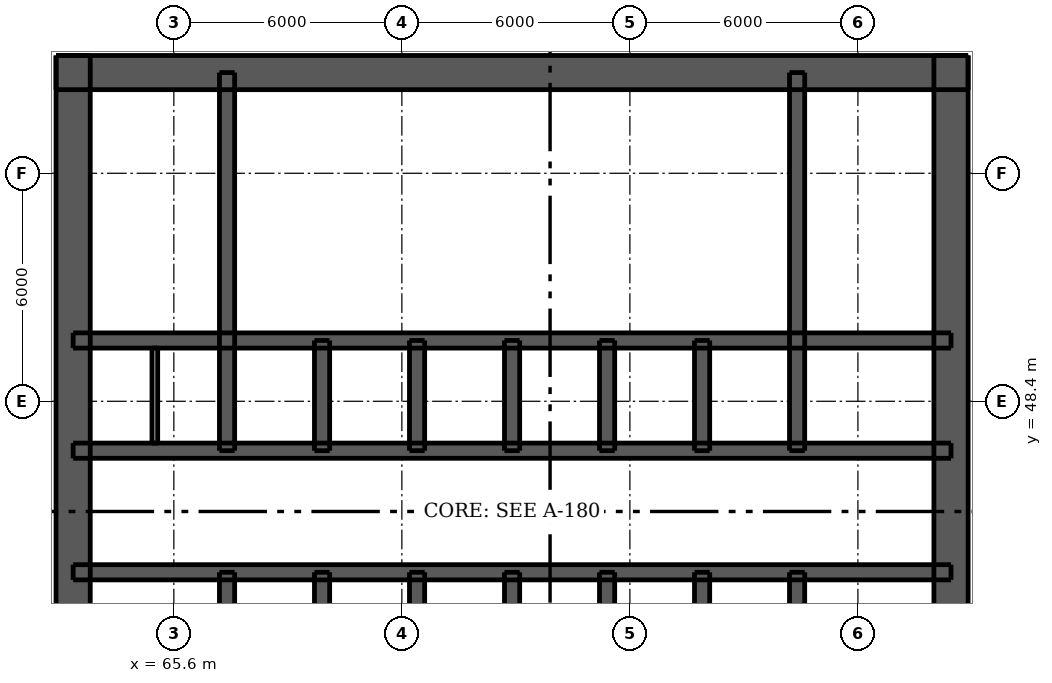
"""IFC4 building model, lengths in metres.
Left out: names, types, materials, properties, quantities, classifications, styles, units other than length and angle.
Written with IfcOpenShell. Run it as: python <this file> out.ifc"""

import sys

from ifc_helpers import new_model, si_unit, direction, frame, frame_2d, origin, place, context, subcontext, project, spatial, rectangle, extrude, element, fill, save


model = new_model("IFC4")
c1 = context("Model", 3, precision=1e-05, world=origin(), true_north=direction((0.0, 1.0)))
c2 = subcontext(c1, "Body", "Model", "MODEL_VIEW")
j1 = project(units=[si_unit("LENGTHUNIT", "METRE"), si_unit("PLANEANGLEUNIT", "RADIAN")], contexts=[c1])
p1 = place(None, origin())
s1 = spatial("IfcSite", under=j1, at=p1, CompositionType="ELEMENT")
p2 = place(p1, origin())
s2 = spatial("IfcBuilding", under=s1, at=p2, CompositionType="ELEMENT")
p3 = place(p2, origin())
s3 = spatial("IfcBuildingStorey", under=s2, at=p3, CompositionType="ELEMENT", Elevation=0.0)
p4 = place(p3, frame((62.5, 57.05, -2.5), z_axis=(0.0, 0.0, 1.0), x_axis=(1.0, 0.0, 0.0)))
e1 = element("IfcWall", 1, at=p4, inside=s3, PredefinedType="SHEAR", context=c2, shape_type="SweptSolid", body=[
    extrude(rectangle(XDim=24.0, YDim=0.9, at=frame_2d((12.0, 0.0))), origin(), (0.0, 0.0, 1.0), 7.7),
])
p5 = place(p4, frame((20.85, 0.0, 2.5)))
e2 = element("IfcOpeningElement", 2, at=p5, cuts=e1, PredefinedType="OPENING", context=c2, shape_type="SweptSolid", body=[
    extrude(rectangle(XDim=1.1, YDim=2.1, at=frame_2d((0.55, 1.05))), frame((0.0, 0.46, 0.0), z_axis=(0.0, -1.0, 0.0), x_axis=(1.0, 0.0, 0.0)), (0.0, 0.0, 1.0), 0.92),
])
p6 = place(p4, frame((2.05, 0.0, 2.5)))
e3 = element("IfcOpeningElement", 3, at=p6, cuts=e1, PredefinedType="OPENING", context=c2, shape_type="SweptSolid", body=[
    extrude(rectangle(XDim=1.1, YDim=2.1, at=frame_2d((0.55, 1.05))), frame((0.0, 0.46, 0.0), z_axis=(0.0, -1.0, 0.0), x_axis=(1.0, 0.0, 0.0)), (0.0, 0.0, 1.0), 0.92),
])
p7 = place(p4, frame((11.55, 0.0, 2.5)))
e4 = element("IfcOpeningElement", 4, at=p7, cuts=e1, PredefinedType="OPENING", context=c2, shape_type="SweptSolid", body=[
    extrude(rectangle(XDim=0.9, YDim=2.1, at=frame_2d((0.45, 1.05))), frame((0.0, 0.46, 0.0), z_axis=(0.0, -1.0, 0.0), x_axis=(1.0, 0.0, 0.0)), (0.0, 0.0, 1.0), 0.92),
])
p8 = place(p3, frame((62.95, 33.5, -2.5), z_axis=(0.0, 0.0, 1.0), x_axis=(0.0, 1.0, 0.0)))
e5 = element("IfcWall", 5, at=p8, inside=s3, PredefinedType="SHEAR", context=c2, shape_type="SweptSolid", body=[
    extrude(rectangle(XDim=24.0, YDim=0.9, at=frame_2d((12.0, 0.0))), origin(), (0.0, 0.0, 1.0), 7.7),
])
p9 = place(p8, frame((11.2, 0.0, 2.5)))
e6 = element("IfcOpeningElement", 6, at=p9, cuts=e5, PredefinedType="OPENING", context=c2, shape_type="SweptSolid", body=[
    extrude(rectangle(XDim=1.6, YDim=2.1, at=frame_2d((0.8, 1.05))), frame((0.0, 0.46, 0.0), z_axis=(0.0, -1.0, 0.0), x_axis=(1.0, 0.0, 0.0)), (0.0, 0.0, 1.0), 0.92),
])
p10 = place(p3, frame((86.05, 33.5, -2.5), z_axis=(0.0, 0.0, 1.0), x_axis=(0.0, 1.0, 0.0)))
e7 = element("IfcWall", 7, at=p10, inside=s3, PredefinedType="SHEAR", context=c2, shape_type="SweptSolid", body=[
    extrude(rectangle(XDim=24.0, YDim=0.9, at=frame_2d((12.0, 0.0))), origin(), (0.0, 0.0, 1.0), 7.7),
])
p11 = place(p10, frame((11.2, 0.0, 2.5)))
e8 = element("IfcOpeningElement", 8, at=p11, cuts=e7, PredefinedType="OPENING", context=c2, shape_type="SweptSolid", body=[
    extrude(rectangle(XDim=1.6, YDim=2.1, at=frame_2d((0.8, 1.05))), frame((0.0, 0.46, 0.0), z_axis=(0.0, -1.0, 0.0), x_axis=(1.0, 0.0, 0.0)), (0.0, 0.0, 1.0), 0.92),
])
p12 = place(p3, frame((62.95, 43.9, -2.5), z_axis=(0.0, 0.0, 1.0), x_axis=(1.0, 0.0, 0.0)))
e9 = element("IfcWall", 9, at=p12, inside=s3, PredefinedType="SHEAR", context=c2, shape_type="SweptSolid", body=[
    extrude(rectangle(XDim=23.1, YDim=0.4, at=frame_2d((11.55, 0.0))), origin(), (0.0, 0.0, 1.0), 7.7),
])
p13 = place(p12, frame((1.7, 0.0, 2.5)))
e10 = element("IfcOpeningElement", 10, at=p13, cuts=e9, PredefinedType="OPENING", context=c2, shape_type="SweptSolid", body=[
    extrude(rectangle(XDim=0.9, YDim=2.1, at=frame_2d((0.45, 1.05))), frame((0.0, 0.21, 0.0), z_axis=(0.0, -1.0, 0.0), x_axis=(1.0, 0.0, 0.0)), (0.0, 0.0, 1.0), 0.42),
])
p14 = place(p12, frame((20.5, 0.0, 2.5)))
e11 = element("IfcOpeningElement", 11, at=p14, cuts=e9, PredefinedType="OPENING", context=c2, shape_type="SweptSolid", body=[
    extrude(rectangle(XDim=0.9, YDim=2.1, at=frame_2d((0.45, 1.05))), frame((0.0, 0.21, 0.0), z_axis=(0.0, -1.0, 0.0), x_axis=(1.0, 0.0, 0.0)), (0.0, 0.0, 1.0), 0.42),
])
p15 = place(p12, frame((4.75, 0.0, 2.5)))
e12 = element("IfcOpeningElement", 12, at=p15, cuts=e9, PredefinedType="OPENING", context=c2, shape_type="SweptSolid", body=[
    extrude(rectangle(XDim=1.1, YDim=2.1, at=frame_2d((0.55, 1.05))), frame((0.0, 0.21, 0.0), z_axis=(0.0, -1.0, 0.0), x_axis=(1.0, 0.0, 0.0)), (0.0, 0.0, 1.0), 0.42),
])
p16 = place(p12, frame((7.25, 0.0, 2.5)))
e13 = element("IfcOpeningElement", 13, at=p16, cuts=e9, PredefinedType="OPENING", context=c2, shape_type="SweptSolid", body=[
    extrude(rectangle(XDim=1.1, YDim=2.1, at=frame_2d((0.55, 1.05))), frame((0.0, 0.21, 0.0), z_axis=(0.0, -1.0, 0.0), x_axis=(1.0, 0.0, 0.0)), (0.0, 0.0, 1.0), 0.42),
])
p17 = place(p12, frame((9.75, 0.0, 2.5)))
e14 = element("IfcOpeningElement", 14, at=p17, cuts=e9, PredefinedType="OPENING", context=c2, shape_type="SweptSolid", body=[
    extrude(rectangle(XDim=1.1, YDim=2.1, at=frame_2d((0.55, 1.05))), frame((0.0, 0.21, 0.0), z_axis=(0.0, -1.0, 0.0), x_axis=(1.0, 0.0, 0.0)), (0.0, 0.0, 1.0), 0.42),
])
p18 = place(p12, frame((12.25, 0.0, 2.5)))
e15 = element("IfcOpeningElement", 15, at=p18, cuts=e9, PredefinedType="OPENING", context=c2, shape_type="SweptSolid", body=[
    extrude(rectangle(XDim=1.1, YDim=2.1, at=frame_2d((0.55, 1.05))), frame((0.0, 0.21, 0.0), z_axis=(0.0, -1.0, 0.0), x_axis=(1.0, 0.0, 0.0)), (0.0, 0.0, 1.0), 0.42),
])
p19 = place(p12, frame((14.75, 0.0, 2.5)))
e16 = element("IfcOpeningElement", 16, at=p19, cuts=e9, PredefinedType="OPENING", context=c2, shape_type="SweptSolid", body=[
    extrude(rectangle(XDim=1.1, YDim=2.1, at=frame_2d((0.55, 1.05))), frame((0.0, 0.21, 0.0), z_axis=(0.0, -1.0, 0.0), x_axis=(1.0, 0.0, 0.0)), (0.0, 0.0, 1.0), 0.42),
])
p20 = place(p12, frame((17.25, 0.0, 2.5)))
e17 = element("IfcOpeningElement", 17, at=p20, cuts=e9, PredefinedType="OPENING", context=c2, shape_type="SweptSolid", body=[
    extrude(rectangle(XDim=1.1, YDim=2.1, at=frame_2d((0.55, 1.05))), frame((0.0, 0.21, 0.0), z_axis=(0.0, -1.0, 0.0), x_axis=(1.0, 0.0, 0.0)), (0.0, 0.0, 1.0), 0.42),
])
p21 = place(p3, frame((62.95, 47.1, -2.5), z_axis=(0.0, 0.0, 1.0), x_axis=(1.0, 0.0, 0.0)))
e18 = element("IfcWall", 18, at=p21, inside=s3, PredefinedType="SHEAR", context=c2, shape_type="SweptSolid", body=[
    extrude(rectangle(XDim=23.1, YDim=0.4, at=frame_2d((11.55, 0.0))), origin(), (0.0, 0.0, 1.0), 7.7),
])
p22 = place(p21, frame((0.85, 0.0, 2.5)))
e19 = element("IfcOpeningElement", 19, at=p22, cuts=e18, PredefinedType="OPENING", context=c2, shape_type="SweptSolid", body=[
    extrude(rectangle(XDim=0.9, YDim=2.1, at=frame_2d((0.45, 1.05))), frame((0.0, 0.21, 0.0), z_axis=(0.0, -1.0, 0.0), x_axis=(1.0, 0.0, 0.0)), (0.0, 0.0, 1.0), 0.42),
])
p23 = place(p21, frame((2.55, 0.0, 2.5)))
e20 = element("IfcOpeningElement", 20, at=p23, cuts=e18, PredefinedType="OPENING", context=c2, shape_type="SweptSolid", body=[
    extrude(rectangle(XDim=0.9, YDim=2.1, at=frame_2d((0.45, 1.05))), frame((0.0, 0.21, 0.0), z_axis=(0.0, -1.0, 0.0), x_axis=(1.0, 0.0, 0.0)), (0.0, 0.0, 1.0), 0.42),
])
p24 = place(p21, frame((20.5, 0.0, 2.5)))
e21 = element("IfcOpeningElement", 21, at=p24, cuts=e18, PredefinedType="OPENING", context=c2, shape_type="SweptSolid", body=[
    extrude(rectangle(XDim=0.9, YDim=2.1, at=frame_2d((0.45, 1.05))), frame((0.0, 0.21, 0.0), z_axis=(0.0, -1.0, 0.0), x_axis=(1.0, 0.0, 0.0)), (0.0, 0.0, 1.0), 0.42),
])
p25 = place(p21, frame((4.75, 0.0, 2.5)))
e22 = element("IfcOpeningElement", 22, at=p25, cuts=e18, PredefinedType="OPENING", context=c2, shape_type="SweptSolid", body=[
    extrude(rectangle(XDim=1.1, YDim=2.1, at=frame_2d((0.55, 1.05))), frame((0.0, 0.21, 0.0), z_axis=(0.0, -1.0, 0.0), x_axis=(1.0, 0.0, 0.0)), (0.0, 0.0, 1.0), 0.42),
])
p26 = place(p21, frame((7.25, 0.0, 2.5)))
e23 = element("IfcOpeningElement", 23, at=p26, cuts=e18, PredefinedType="OPENING", context=c2, shape_type="SweptSolid", body=[
    extrude(rectangle(XDim=1.1, YDim=2.1, at=frame_2d((0.55, 1.05))), frame((0.0, 0.21, 0.0), z_axis=(0.0, -1.0, 0.0), x_axis=(1.0, 0.0, 0.0)), (0.0, 0.0, 1.0), 0.42),
])
p27 = place(p21, frame((9.75, 0.0, 2.5)))
e24 = element("IfcOpeningElement", 24, at=p27, cuts=e18, PredefinedType="OPENING", context=c2, shape_type="SweptSolid", body=[
    extrude(rectangle(XDim=1.1, YDim=2.1, at=frame_2d((0.55, 1.05))), frame((0.0, 0.21, 0.0), z_axis=(0.0, -1.0, 0.0), x_axis=(1.0, 0.0, 0.0)), (0.0, 0.0, 1.0), 0.42),
])
p28 = place(p21, frame((12.25, 0.0, 2.5)))
e25 = element("IfcOpeningElement", 25, at=p28, cuts=e18, PredefinedType="OPENING", context=c2, shape_type="SweptSolid", body=[
    extrude(rectangle(XDim=1.1, YDim=2.1, at=frame_2d((0.55, 1.05))), frame((0.0, 0.21, 0.0), z_axis=(0.0, -1.0, 0.0), x_axis=(1.0, 0.0, 0.0)), (0.0, 0.0, 1.0), 0.42),
])
p29 = place(p21, frame((14.75, 0.0, 2.5)))
e26 = element("IfcOpeningElement", 26, at=p29, cuts=e18, PredefinedType="OPENING", context=c2, shape_type="SweptSolid", body=[
    extrude(rectangle(XDim=1.1, YDim=2.1, at=frame_2d((0.55, 1.05))), frame((0.0, 0.21, 0.0), z_axis=(0.0, -1.0, 0.0), x_axis=(1.0, 0.0, 0.0)), (0.0, 0.0, 1.0), 0.42),
])
p30 = place(p21, frame((17.25, 0.0, 2.5)))
e27 = element("IfcOpeningElement", 27, at=p30, cuts=e18, PredefinedType="OPENING", context=c2, shape_type="SweptSolid", body=[
    extrude(rectangle(XDim=1.1, YDim=2.1, at=frame_2d((0.55, 1.05))), frame((0.0, 0.21, 0.0), z_axis=(0.0, -1.0, 0.0), x_axis=(1.0, 0.0, 0.0)), (0.0, 0.0, 1.0), 0.42),
])
p31 = place(p3, frame((62.95, 50.0, -2.5), z_axis=(0.0, 0.0, 1.0), x_axis=(1.0, 0.0, 0.0)))
e28 = element("IfcWall", 28, at=p31, inside=s3, PredefinedType="SHEAR", context=c2, shape_type="SweptSolid", body=[
    extrude(rectangle(XDim=23.1, YDim=0.4, at=frame_2d((11.55, 0.0))), origin(), (0.0, 0.0, 1.0), 7.7),
])
p32 = place(p3, frame((67.0, 33.95, -2.5), z_axis=(0.0, 0.0, 1.0), x_axis=(0.0, 1.0, 0.0)))
e29 = element("IfcWall", 29, at=p32, inside=s3, PredefinedType="SHEAR", context=c2, shape_type="SweptSolid", body=[
    extrude(rectangle(XDim=9.95, YDim=0.4, at=frame_2d((4.975, 0.0))), origin(), (0.0, 0.0, 1.0), 7.7),
])
p33 = place(p32, frame((0.65, 0.0, 2.5)))
e30 = element("IfcOpeningElement", 30, at=p33, cuts=e29, PredefinedType="OPENING", context=c2, shape_type="SweptSolid", body=[
    extrude(rectangle(XDim=1.1, YDim=2.1, at=frame_2d((0.55, 1.05))), frame((0.0, 0.21, 0.0), z_axis=(0.0, -1.0, 0.0), x_axis=(1.0, 0.0, 0.0)), (0.0, 0.0, 1.0), 0.42),
])
for number, where, z_axis, x_axis in (
    (31, (67.0, 47.1, -2.5), (0.0, 0.0, 1.0), (0.0, 1.0, 0.0)),
    (32, (82.0, 33.95, -2.5), (0.0, 0.0, 1.0), (0.0, 1.0, 0.0)),
    (33, (82.0, 47.1, -2.5), (0.0, 0.0, 1.0), (0.0, 1.0, 0.0)),
):
    element("IfcWall", number, at=place(p3, frame(where, z_axis=z_axis, x_axis=x_axis)), inside=s3, PredefinedType="SHEAR", context=c2, shape_type="SweptSolid", body=[
        extrude(rectangle(XDim=9.95, YDim=0.4, at=frame_2d((4.975, 0.0))), origin(), (0.0, 0.0, 1.0), 7.7),
    ])
for number, where, z_axis, x_axis in (
    (34, (69.5, 41.0, -2.5), (0.0, 0.0, 1.0), (0.0, 1.0, 0.0)),
    (35, (69.5, 47.1, -2.5), (0.0, 0.0, 1.0), (0.0, 1.0, 0.0)),
    (36, (72.0, 41.0, -2.5), (0.0, 0.0, 1.0), (0.0, 1.0, 0.0)),
    (37, (72.0, 47.1, -2.5), (0.0, 0.0, 1.0), (0.0, 1.0, 0.0)),
    (38, (74.5, 41.0, -2.5), (0.0, 0.0, 1.0), (0.0, 1.0, 0.0)),
    (39, (74.5, 47.1, -2.5), (0.0, 0.0, 1.0), (0.0, 1.0, 0.0)),
    (40, (77.0, 41.0, -2.5), (0.0, 0.0, 1.0), (0.0, 1.0, 0.0)),
    (41, (77.0, 47.1, -2.5), (0.0, 0.0, 1.0), (0.0, 1.0, 0.0)),
    (42, (79.5, 41.0, -2.5), (0.0, 0.0, 1.0), (0.0, 1.0, 0.0)),
    (43, (79.5, 47.1, -2.5), (0.0, 0.0, 1.0), (0.0, 1.0, 0.0)),
):
    element("IfcWall", number, at=place(p3, frame(where, z_axis=z_axis, x_axis=x_axis)), inside=s3, PredefinedType="SHEAR", context=c2, shape_type="SweptSolid", body=[
        extrude(rectangle(XDim=2.9, YDim=0.4, at=frame_2d((1.45, 0.0))), origin(), (0.0, 0.0, 1.0), 7.7),
    ])
p34 = place(p3, frame((65.1, 47.3, 0.0), z_axis=(0.0, 0.0, 1.0), x_axis=(0.0, 1.0, 0.0)))
e44 = element("IfcWall", 44, at=p34, inside=s3, PredefinedType="PLUMBINGWALL", context=c2, shape_type="SweptSolid", body=[
    extrude(rectangle(XDim=2.5, YDim=0.15, at=frame_2d((1.25, 0.0))), origin(), (0.0, 0.0, 1.0), 5.2),
])
p35 = place(p5, origin())
e45 = element("IfcDoor", 45, at=p35, inside=s3, OperationType="SINGLE_SWING_RIGHT", PredefinedType="DOOR", context=c2, shape_type="SweptSolid", body=[
    extrude(rectangle(XDim=1.1, YDim=2.1, at=frame_2d((0.55, 1.05))), frame((0.0, -0.388, 0.0), z_axis=(0.0, -1.0, 0.0), x_axis=(1.0, 0.0, 0.0)), (0.0, 0.0, 1.0), 0.05),
])
fill(e2, e45)
p36 = place(p6, origin())
e46 = element("IfcDoor", 46, at=p36, inside=s3, OperationType="SINGLE_SWING_LEFT", PredefinedType="DOOR", context=c2, shape_type="SweptSolid", body=[
    extrude(rectangle(XDim=1.1, YDim=2.1, at=frame_2d((0.55, 1.05))), frame((0.0, -0.388, 0.0), z_axis=(0.0, -1.0, 0.0), x_axis=(1.0, 0.0, 0.0)), (0.0, 0.0, 1.0), 0.05),
])
fill(e3, e46)
p37 = place(p9, origin())
e47 = element("IfcDoor", 47, at=p37, inside=s3, OperationType="DOUBLE_DOOR_SINGLE_SWING", PredefinedType="DOOR", context=c2, shape_type="SweptSolid", body=[
    extrude(rectangle(XDim=1.6, YDim=2.1, at=frame_2d((0.8, 1.05))), frame((0.0, -0.388, 0.0), z_axis=(0.0, -1.0, 0.0), x_axis=(1.0, 0.0, 0.0)), (0.0, 0.0, 1.0), 0.05),
])
fill(e6, e47)
p38 = place(p11, origin())
e48 = element("IfcDoor", 48, at=p38, inside=s3, OperationType="DOUBLE_DOOR_SINGLE_SWING", PredefinedType="DOOR", context=c2, shape_type="SweptSolid", body=[
    extrude(rectangle(XDim=1.6, YDim=2.1, at=frame_2d((0.8, 1.05))), frame((0.0, 0.438, 0.0), z_axis=(0.0, -1.0, 0.0), x_axis=(1.0, 0.0, 0.0)), (0.0, 0.0, 1.0), 0.05),
])
fill(e8, e48)
p39 = place(p13, origin())
e49 = element("IfcDoor", 49, at=p39, inside=s3, OperationType="SINGLE_SWING_LEFT", PredefinedType="DOOR", context=c2, shape_type="SweptSolid", body=[
    extrude(rectangle(XDim=0.9, YDim=2.1, at=frame_2d((0.45, 1.05))), frame((0.0, -0.138, 0.0), z_axis=(0.0, -1.0, 0.0), x_axis=(1.0, 0.0, 0.0)), (0.0, 0.0, 1.0), 0.05),
])
fill(e10, e49)
p40 = place(p14, origin())
e50 = element("IfcDoor", 50, at=p40, inside=s3, OperationType="SINGLE_SWING_LEFT", PredefinedType="DOOR", context=c2, shape_type="SweptSolid", body=[
    extrude(rectangle(XDim=0.9, YDim=2.1, at=frame_2d((0.45, 1.05))), frame((0.0, -0.138, 0.0), z_axis=(0.0, -1.0, 0.0), x_axis=(1.0, 0.0, 0.0)), (0.0, 0.0, 1.0), 0.05),
])
fill(e11, e50)
p41 = place(p22, origin())
e51 = element("IfcDoor", 51, at=p41, inside=s3, OperationType="SINGLE_SWING_LEFT", PredefinedType="DOOR", context=c2, shape_type="SweptSolid", body=[
    extrude(rectangle(XDim=0.9, YDim=2.1, at=frame_2d((0.45, 1.05))), frame((0.0, 0.188, 0.0), z_axis=(0.0, -1.0, 0.0), x_axis=(1.0, 0.0, 0.0)), (0.0, 0.0, 1.0), 0.05),
])
fill(e19, e51)
p42 = place(p23, origin())
e52 = element("IfcDoor", 52, at=p42, inside=s3, OperationType="SINGLE_SWING_RIGHT", PredefinedType="DOOR", context=c2, shape_type="SweptSolid", body=[
    extrude(rectangle(XDim=0.9, YDim=2.1, at=frame_2d((0.45, 1.05))), frame((0.0, 0.188, 0.0), z_axis=(0.0, -1.0, 0.0), x_axis=(1.0, 0.0, 0.0)), (0.0, 0.0, 1.0), 0.05),
])
fill(e20, e52)
p43 = place(p24, origin())
e53 = element("IfcDoor", 53, at=p43, inside=s3, OperationType="SINGLE_SWING_LEFT", PredefinedType="DOOR", context=c2, shape_type="SweptSolid", body=[
    extrude(rectangle(XDim=0.9, YDim=2.1, at=frame_2d((0.45, 1.05))), frame((0.0, 0.188, 0.0), z_axis=(0.0, -1.0, 0.0), x_axis=(1.0, 0.0, 0.0)), (0.0, 0.0, 1.0), 0.05),
])
fill(e21, e53)
p44 = place(p7, origin())
e54 = element("IfcDoor", 54, at=p44, inside=s3, OperationType="SINGLE_SWING_RIGHT", PredefinedType="DOOR", context=c2, shape_type="SweptSolid", body=[
    extrude(rectangle(XDim=0.9, YDim=2.1, at=frame_2d((0.45, 1.05))), frame((0.0, -0.388, 0.0), z_axis=(0.0, -1.0, 0.0), x_axis=(1.0, 0.0, 0.0)), (0.0, 0.0, 1.0), 0.05),
])
fill(e4, e54)
p45 = place(p15, origin())
e55 = element("IfcDoor", 55, at=p45, inside=s3, OperationType="DOUBLE_DOOR_SLIDING", PredefinedType="DOOR", context=c2, shape_type="SweptSolid", body=[
    extrude(rectangle(XDim=1.1, YDim=2.1, at=frame_2d((0.55, 1.05))), frame((0.0, 0.025, 0.0), z_axis=(0.0, -1.0, 0.0), x_axis=(1.0, 0.0, 0.0)), (0.0, 0.0, 1.0), 0.05),
])
fill(e12, e55)
p46 = place(p25, origin())
e56 = element("IfcDoor", 56, at=p46, inside=s3, OperationType="DOUBLE_DOOR_SLIDING", PredefinedType="DOOR", context=c2, shape_type="SweptSolid", body=[
    extrude(rectangle(XDim=1.1, YDim=2.1, at=frame_2d((0.55, 1.05))), frame((0.0, 0.025, 0.0), z_axis=(0.0, -1.0, 0.0), x_axis=(1.0, 0.0, 0.0)), (0.0, 0.0, 1.0), 0.05),
])
fill(e22, e56)
p47 = place(p16, origin())
e57 = element("IfcDoor", 57, at=p47, inside=s3, OperationType="DOUBLE_DOOR_SLIDING", PredefinedType="DOOR", context=c2, shape_type="SweptSolid", body=[
    extrude(rectangle(XDim=1.1, YDim=2.1, at=frame_2d((0.55, 1.05))), frame((0.0, 0.025, 0.0), z_axis=(0.0, -1.0, 0.0), x_axis=(1.0, 0.0, 0.0)), (0.0, 0.0, 1.0), 0.05),
])
fill(e13, e57)
p48 = place(p26, origin())
e58 = element("IfcDoor", 58, at=p48, inside=s3, OperationType="DOUBLE_DOOR_SLIDING", PredefinedType="DOOR", context=c2, shape_type="SweptSolid", body=[
    extrude(rectangle(XDim=1.1, YDim=2.1, at=frame_2d((0.55, 1.05))), frame((0.0, 0.025, 0.0), z_axis=(0.0, -1.0, 0.0), x_axis=(1.0, 0.0, 0.0)), (0.0, 0.0, 1.0), 0.05),
])
fill(e23, e58)
p49 = place(p17, origin())
e59 = element("IfcDoor", 59, at=p49, inside=s3, OperationType="DOUBLE_DOOR_SLIDING", PredefinedType="DOOR", context=c2, shape_type="SweptSolid", body=[
    extrude(rectangle(XDim=1.1, YDim=2.1, at=frame_2d((0.55, 1.05))), frame((0.0, 0.025, 0.0), z_axis=(0.0, -1.0, 0.0), x_axis=(1.0, 0.0, 0.0)), (0.0, 0.0, 1.0), 0.05),
])
fill(e14, e59)
p50 = place(p27, origin())
e60 = element("IfcDoor", 60, at=p50, inside=s3, OperationType="DOUBLE_DOOR_SLIDING", PredefinedType="DOOR", context=c2, shape_type="SweptSolid", body=[
    extrude(rectangle(XDim=1.1, YDim=2.1, at=frame_2d((0.55, 1.05))), frame((0.0, 0.025, 0.0), z_axis=(0.0, -1.0, 0.0), x_axis=(1.0, 0.0, 0.0)), (0.0, 0.0, 1.0), 0.05),
])
fill(e24, e60)
p51 = place(p18, origin())
e61 = element("IfcDoor", 61, at=p51, inside=s3, OperationType="DOUBLE_DOOR_SLIDING", PredefinedType="DOOR", context=c2, shape_type="SweptSolid", body=[
    extrude(rectangle(XDim=1.1, YDim=2.1, at=frame_2d((0.55, 1.05))), frame((0.0, 0.025, 0.0), z_axis=(0.0, -1.0, 0.0), x_axis=(1.0, 0.0, 0.0)), (0.0, 0.0, 1.0), 0.05),
])
fill(e15, e61)
p52 = place(p28, origin())
e62 = element("IfcDoor", 62, at=p52, inside=s3, OperationType="DOUBLE_DOOR_SLIDING", PredefinedType="DOOR", context=c2, shape_type="SweptSolid", body=[
    extrude(rectangle(XDim=1.1, YDim=2.1, at=frame_2d((0.55, 1.05))), frame((0.0, 0.025, 0.0), z_axis=(0.0, -1.0, 0.0), x_axis=(1.0, 0.0, 0.0)), (0.0, 0.0, 1.0), 0.05),
])
fill(e25, e62)
p53 = place(p19, origin())
e63 = element("IfcDoor", 63, at=p53, inside=s3, OperationType="DOUBLE_DOOR_SLIDING", PredefinedType="DOOR", context=c2, shape_type="SweptSolid", body=[
    extrude(rectangle(XDim=1.1, YDim=2.1, at=frame_2d((0.55, 1.05))), frame((0.0, 0.025, 0.0), z_axis=(0.0, -1.0, 0.0), x_axis=(1.0, 0.0, 0.0)), (0.0, 0.0, 1.0), 0.05),
])
fill(e16, e63)
p54 = place(p29, origin())
e64 = element("IfcDoor", 64, at=p54, inside=s3, OperationType="DOUBLE_DOOR_SLIDING", PredefinedType="DOOR", context=c2, shape_type="SweptSolid", body=[
    extrude(rectangle(XDim=1.1, YDim=2.1, at=frame_2d((0.55, 1.05))), frame((0.0, 0.025, 0.0), z_axis=(0.0, -1.0, 0.0), x_axis=(1.0, 0.0, 0.0)), (0.0, 0.0, 1.0), 0.05),
])
fill(e26, e64)
p55 = place(p20, origin())
e65 = element("IfcDoor", 65, at=p55, inside=s3, OperationType="DOUBLE_DOOR_SLIDING", PredefinedType="DOOR", context=c2, shape_type="SweptSolid", body=[
    extrude(rectangle(XDim=1.1, YDim=2.1, at=frame_2d((0.55, 1.05))), frame((0.0, 0.025, 0.0), z_axis=(0.0, -1.0, 0.0), x_axis=(1.0, 0.0, 0.0)), (0.0, 0.0, 1.0), 0.05),
])
fill(e17, e65)
p56 = place(p30, origin())
e66 = element("IfcDoor", 66, at=p56, inside=s3, OperationType="DOUBLE_DOOR_SLIDING", PredefinedType="DOOR", context=c2, shape_type="SweptSolid", body=[
    extrude(rectangle(XDim=1.1, YDim=2.1, at=frame_2d((0.55, 1.05))), frame((0.0, 0.025, 0.0), z_axis=(0.0, -1.0, 0.0), x_axis=(1.0, 0.0, 0.0)), (0.0, 0.0, 1.0), 0.05),
])
fill(e27, e66)
save(model, sys.argv[1])
